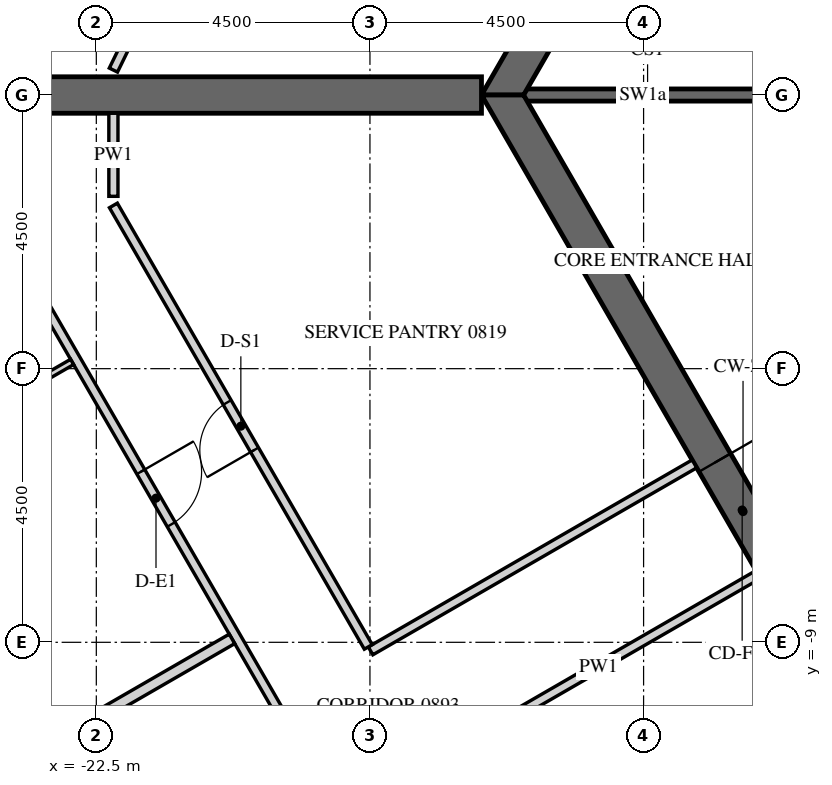
"""IFC4 building model, lengths in metres.
Left out: names, types, materials, properties, quantities, classifications, styles, units other than length and angle.
Written with IfcOpenShell. Run it as: python <this file> out.ifc"""

import sys

from ifc_helpers import new_model, si_unit, direction, frame, frame_2d, origin, place, context, subcontext, project, spatial, polyline, rectangle, outline, extrude, element, fill, save


model = new_model("IFC4")
c1 = context("Model", 3, precision=1e-05, world=origin(), true_north=direction((0.0, 1.0)))
c2 = subcontext(c1, "Body", "Model", "MODEL_VIEW")
j1 = project(units=[si_unit("LENGTHUNIT", "METRE"), si_unit("PLANEANGLEUNIT", "RADIAN")], contexts=[c1])
p1 = place(None, origin())
s1 = spatial("IfcSite", under=j1, at=p1, CompositionType="ELEMENT")
p2 = place(p1, origin())
s2 = spatial("IfcBuilding", under=s1, at=p2, CompositionType="ELEMENT")
p3 = place(p2, frame((0.0, 0.0, 111.6)))
s3 = spatial("IfcBuildingStorey", under=s2, at=p3, CompositionType="ELEMENT", Elevation=111.6)
p4 = place(p3, frame((-19.595, 27.633, -0.15), z_axis=(0.0, 0.0, 1.0), x_axis=(-0.438368285794, -0.898795441694, 0.0)))
e1 = element("IfcWall", 1, at=p4, inside=s3, PredefinedType="SOLIDWALL", context=c2, shape_type="SweptSolid", body=[
    extrude(outline(polyline([(-0.026, -0.275), (30.093, -0.275), (30.048, 0.275), (0.026, 0.275), (-0.026, -0.275)])), origin(), (0.0, 0.0, 1.0), 3.9),
])
p5 = place(p4, frame((1.236, 0.0, 1.05)))
e2 = element("IfcOpeningElement", 2, at=p5, cuts=e1, PredefinedType="OPENING", context=c2, shape_type="SweptSolid", body=[
    extrude(rectangle(XDim=2.4, YDim=2.4, at=frame_2d((1.2, 1.2))), frame((0.0, 0.285, 0.0), z_axis=(0.0, -1.0, 0.0), x_axis=(1.0, 0.0, 0.0)), (0.0, 0.0, 1.0), 0.57),
])
p6 = place(p4, frame((4.835, 0.0, 1.05)))
e3 = element("IfcOpeningElement", 3, at=p6, cuts=e1, PredefinedType="OPENING", context=c2, shape_type="SweptSolid", body=[
    extrude(rectangle(XDim=2.4, YDim=2.4, at=frame_2d((1.2, 1.2))), frame((0.0, 0.285, 0.0), z_axis=(0.0, -1.0, 0.0), x_axis=(1.0, 0.0, 0.0)), (0.0, 0.0, 1.0), 0.57),
])
p7 = place(p4, frame((8.436, 0.0, 1.05)))
e4 = element("IfcOpeningElement", 4, at=p7, cuts=e1, PredefinedType="OPENING", context=c2, shape_type="SweptSolid", body=[
    extrude(rectangle(XDim=2.4, YDim=2.4, at=frame_2d((1.2, 1.2))), frame((0.0, 0.285, 0.0), z_axis=(0.0, -1.0, 0.0), x_axis=(1.0, 0.0, 0.0)), (0.0, 0.0, 1.0), 0.57),
])
p8 = place(p4, frame((12.035, 0.0, 1.05)))
e5 = element("IfcOpeningElement", 5, at=p8, cuts=e1, PredefinedType="OPENING", context=c2, shape_type="SweptSolid", body=[
    extrude(rectangle(XDim=2.4, YDim=2.4, at=frame_2d((1.2, 1.2))), frame((0.0, 0.285, 0.0), z_axis=(0.0, -1.0, 0.0), x_axis=(1.0, 0.0, 0.0)), (0.0, 0.0, 1.0), 0.57),
])
p9 = place(p4, frame((15.635, 0.0, 1.05)))
e6 = element("IfcOpeningElement", 6, at=p9, cuts=e1, PredefinedType="OPENING", context=c2, shape_type="SweptSolid", body=[
    extrude(rectangle(XDim=2.4, YDim=2.4, at=frame_2d((1.2, 1.2))), frame((0.0, 0.285, 0.0), z_axis=(0.0, -1.0, 0.0), x_axis=(1.0, 0.0, 0.0)), (0.0, 0.0, 1.0), 0.57),
])
p10 = place(p4, frame((19.236, 0.0, 1.05)))
e7 = element("IfcOpeningElement", 7, at=p10, cuts=e1, PredefinedType="OPENING", context=c2, shape_type="SweptSolid", body=[
    extrude(rectangle(XDim=2.4, YDim=2.4, at=frame_2d((1.2, 1.2))), frame((0.0, 0.285, 0.0), z_axis=(0.0, -1.0, 0.0), x_axis=(1.0, 0.0, 0.0)), (0.0, 0.0, 1.0), 0.57),
])
p11 = place(p4, frame((22.835, 0.0, 1.05)))
e8 = element("IfcOpeningElement", 8, at=p11, cuts=e1, PredefinedType="OPENING", context=c2, shape_type="SweptSolid", body=[
    extrude(rectangle(XDim=2.4, YDim=2.4, at=frame_2d((1.2, 1.2))), frame((0.0, 0.285, 0.0), z_axis=(0.0, -1.0, 0.0), x_axis=(1.0, 0.0, 0.0)), (0.0, 0.0, 1.0), 0.57),
])
p12 = place(p4, frame((26.436, 0.0, 1.05)))
e9 = element("IfcOpeningElement", 9, at=p12, cuts=e1, PredefinedType="OPENING", context=c2, shape_type="SweptSolid", body=[
    extrude(rectangle(XDim=2.4, YDim=2.4, at=frame_2d((1.2, 1.2))), frame((0.0, 0.285, 0.0), z_axis=(0.0, -1.0, 0.0), x_axis=(1.0, 0.0, 0.0)), (0.0, 0.0, 1.0), 0.57),
])
p13 = place(p3, frame((-32.655, -2.89, -0.15), z_axis=(0.0, 0.0, 1.0), x_axis=(0.499997711317, -0.866026725152, 0.0)))
e10 = element("IfcWall", 10, at=p13, inside=s3, PredefinedType="SOLIDWALL", context=c2, shape_type="SweptSolid", body=[
    extrude(outline(polyline([(-0.022, -0.275), (30.097, -0.275), (30.045, 0.275), (0.022, 0.275), (-0.022, -0.275)])), origin(), (0.0, 0.0, 1.0), 3.9),
])
p14 = place(p13, frame((1.236, 0.0, 1.05)))
e11 = element("IfcOpeningElement", 11, at=p14, cuts=e10, PredefinedType="OPENING", context=c2, shape_type="SweptSolid", body=[
    extrude(rectangle(XDim=2.4, YDim=2.4, at=frame_2d((1.2, 1.2))), frame((0.0, 0.285, 0.0), z_axis=(0.0, -1.0, 0.0), x_axis=(1.0, 0.0, 0.0)), (0.0, 0.0, 1.0), 0.57),
])
p15 = place(p13, frame((4.835, 0.0, 1.05)))
e12 = element("IfcOpeningElement", 12, at=p15, cuts=e10, PredefinedType="OPENING", context=c2, shape_type="SweptSolid", body=[
    extrude(rectangle(XDim=2.4, YDim=2.4, at=frame_2d((1.2, 1.2))), frame((0.0, 0.285, 0.0), z_axis=(0.0, -1.0, 0.0), x_axis=(1.0, 0.0, 0.0)), (0.0, 0.0, 1.0), 0.57),
])
p16 = place(p13, frame((8.436, 0.0, 1.05)))
e13 = element("IfcOpeningElement", 13, at=p16, cuts=e10, PredefinedType="OPENING", context=c2, shape_type="SweptSolid", body=[
    extrude(rectangle(XDim=2.4, YDim=2.4, at=frame_2d((1.2, 1.2))), frame((0.0, 0.285, 0.0), z_axis=(0.0, -1.0, 0.0), x_axis=(1.0, 0.0, 0.0)), (0.0, 0.0, 1.0), 0.57),
])
p17 = place(p13, frame((12.035, 0.0, 1.05)))
e14 = element("IfcOpeningElement", 14, at=p17, cuts=e10, PredefinedType="OPENING", context=c2, shape_type="SweptSolid", body=[
    extrude(rectangle(XDim=2.4, YDim=2.4, at=frame_2d((1.2, 1.2))), frame((0.0, 0.285, 0.0), z_axis=(0.0, -1.0, 0.0), x_axis=(1.0, 0.0, 0.0)), (0.0, 0.0, 1.0), 0.57),
])
p18 = place(p13, frame((15.635, 0.0, 1.05)))
e15 = element("IfcOpeningElement", 15, at=p18, cuts=e10, PredefinedType="OPENING", context=c2, shape_type="SweptSolid", body=[
    extrude(rectangle(XDim=2.4, YDim=2.4, at=frame_2d((1.2, 1.2))), frame((0.0, 0.285, 0.0), z_axis=(0.0, -1.0, 0.0), x_axis=(1.0, 0.0, 0.0)), (0.0, 0.0, 1.0), 0.57),
])
p19 = place(p13, frame((19.236, 0.0, 1.05)))
e16 = element("IfcOpeningElement", 16, at=p19, cuts=e10, PredefinedType="OPENING", context=c2, shape_type="SweptSolid", body=[
    extrude(rectangle(XDim=2.4, YDim=2.4, at=frame_2d((1.2, 1.2))), frame((0.0, 0.285, 0.0), z_axis=(0.0, -1.0, 0.0), x_axis=(1.0, 0.0, 0.0)), (0.0, 0.0, 1.0), 0.57),
])
p20 = place(p13, frame((22.835, 0.0, 1.05)))
e17 = element("IfcOpeningElement", 17, at=p20, cuts=e10, PredefinedType="OPENING", context=c2, shape_type="SweptSolid", body=[
    extrude(rectangle(XDim=2.4, YDim=2.4, at=frame_2d((1.2, 1.2))), frame((0.0, 0.285, 0.0), z_axis=(0.0, -1.0, 0.0), x_axis=(1.0, 0.0, 0.0)), (0.0, 0.0, 1.0), 0.57),
])
p21 = place(p13, frame((26.436, 0.0, 1.05)))
e18 = element("IfcOpeningElement", 18, at=p21, cuts=e10, PredefinedType="OPENING", context=c2, shape_type="SweptSolid", body=[
    extrude(rectangle(XDim=2.4, YDim=2.4, at=frame_2d((1.2, 1.2))), frame((0.0, 0.285, 0.0), z_axis=(0.0, -1.0, 0.0), x_axis=(1.0, 0.0, 0.0)), (0.0, 0.0, 1.0), 0.57),
])
p22 = place(p3, frame((-7.91, 13.7, -0.15), z_axis=(0.0, 0.0, 1.0), x_axis=(-0.499999880136, -0.866025472988, 0.0)))
e19 = element("IfcWall", 19, at=p22, inside=s3, PredefinedType="SHEAR", context=c2, shape_type="SweptSolid", body=[
    extrude(outline(polyline([(-0.173, -0.3), (15.993, -0.3), (15.646, 0.3), (0.173, 0.3), (-0.173, -0.3)])), origin(), (0.0, 0.0, 1.0), 3.9),
])
p23 = place(p22, frame((7.039, 0.0, 0.15)))
e20 = element("IfcOpeningElement", 20, at=p23, cuts=e19, PredefinedType="OPENING", context=c2, shape_type="SweptSolid", body=[
    extrude(rectangle(XDim=1.8, YDim=2.4, at=frame_2d((0.9, 1.2))), frame((0.0, 0.31, 0.0), z_axis=(0.0, -1.0, 0.0), x_axis=(1.0, 0.0, 0.0)), (0.0, 0.0, 1.0), 0.62),
])
p24 = place(p3, frame((-15.819, 0.0, -0.15), z_axis=(0.0, 0.0, 1.0), x_axis=(0.499999880136, -0.866025472988, 0.0)))
e21 = element("IfcWall", 21, at=p24, inside=s3, PredefinedType="SHEAR", context=c2, shape_type="SweptSolid", body=[
    extrude(outline(polyline([(-0.173, -0.3), (15.993, -0.3), (15.646, 0.3), (0.173, 0.3), (-0.173, -0.3)])), origin(), (0.0, 0.0, 1.0), 3.9),
])
p25 = place(p24, frame((6.981, 0.0, 0.15)))
e22 = element("IfcOpeningElement", 22, at=p25, cuts=e21, PredefinedType="OPENING", context=c2, shape_type="SweptSolid", body=[
    extrude(rectangle(XDim=1.8, YDim=2.4, at=frame_2d((0.9, 1.2))), frame((0.0, 0.31, 0.0), z_axis=(0.0, -1.0, 0.0), x_axis=(1.0, 0.0, 0.0)), (0.0, 0.0, 1.0), 0.62),
])
p26 = place(p3, frame((-16.166, 0.0, -0.15), z_axis=(0.0, 0.0, 1.0), x_axis=(-1.0, 0.0, 0.0)))
e23 = element("IfcWall", 23, at=p26, inside=s3, PredefinedType="SHEAR", context=c2, shape_type="SweptSolid", body=[
    extrude(rectangle(XDim=16.509, YDim=0.6, at=frame_2d((8.254, 0.0))), origin(), (0.0, 0.0, 1.0), 3.9),
])
p27 = place(p26, frame((7.354, 0.0, 0.15)))
e24 = element("IfcOpeningElement", 24, at=p27, cuts=e23, PredefinedType="OPENING", context=c2, shape_type="SweptSolid", body=[
    extrude(rectangle(XDim=1.8, YDim=2.4, at=frame_2d((0.9, 1.2))), frame((0.0, 0.31, 0.0), z_axis=(0.0, -1.0, 0.0), x_axis=(1.0, 0.0, 0.0)), (0.0, 0.0, 1.0), 0.62),
])
p28 = place(p3, frame((-11.547, 0.0, -0.15), z_axis=(0.0, 0.0, 1.0), x_axis=(-1.0, 0.0, 0.0)))
e25 = element("IfcWall", 25, at=p28, inside=s3, PredefinedType="SHEAR", context=c2, shape_type="SweptSolid", body=[
    extrude(rectangle(XDim=3.926, YDim=0.2, at=frame_2d((1.963, 0.0))), origin(), (0.0, 0.0, 1.0), 3.9),
])
p29 = place(p3, frame((-22.219, 0.41, 0.0), z_axis=(0.0, 0.0, 1.0), x_axis=(0.438391891827, 0.898783927972, 0.0)))
e26 = element("IfcWall", 26, at=p29, inside=s3, PredefinedType="PARTITIONING", context=c2, shape_type="SweptSolid", body=[
    extrude(rectangle(XDim=9.699, YDim=0.15, at=frame_2d((4.85, 0.0))), origin(), (0.0, 0.0, 1.0), 2.988),
])
p30 = place(p29, frame((4.4, 0.0, 0.0)))
e27 = element("IfcOpeningElement", 27, at=p30, cuts=e26, PredefinedType="OPENING", context=c2, shape_type="SweptSolid", body=[
    extrude(rectangle(XDim=0.9, YDim=2.1, at=frame_2d((0.45, 1.05))), frame((0.0, 0.085, 0.0), z_axis=(0.0, -1.0, 0.0), x_axis=(1.0, 0.0, 0.0)), (0.0, 0.0, 1.0), 0.17),
])
p31 = place(p3, frame((-24.09, -2.175, 0.0), z_axis=(0.0, 0.0, 1.0), x_axis=(0.499996832073, -0.86602723278, 0.0)))
e28 = element("IfcWall", 28, at=p31, inside=s3, PredefinedType="PARTITIONING", context=c2, shape_type="SweptSolid", body=[
    extrude(rectangle(XDim=23.877, YDim=0.15, at=frame_2d((11.938, 0.0))), origin(), (0.0, 0.0, 1.0), 2.988),
])
p32 = place(p31, frame((4.643, 0.0, 0.0)))
e29 = element("IfcOpeningElement", 29, at=p32, cuts=e28, PredefinedType="OPENING", context=c2, shape_type="SweptSolid", body=[
    extrude(rectangle(XDim=1.0, YDim=2.1, at=frame_2d((0.5, 1.05))), frame((0.0, 0.085, 0.0), z_axis=(0.0, -1.0, 0.0), x_axis=(1.0, 0.0, 0.0)), (0.0, 0.0, 1.0), 0.17),
])
p33 = place(p31, frame((11.472, 0.0, 0.0)))
e30 = element("IfcOpeningElement", 30, at=p33, cuts=e28, PredefinedType="OPENING", context=c2, shape_type="SweptSolid", body=[
    extrude(rectangle(XDim=1.0, YDim=2.1, at=frame_2d((0.5, 1.05))), frame((0.0, 0.085, 0.0), z_axis=(0.0, -1.0, 0.0), x_axis=(1.0, 0.0, 0.0)), (0.0, 0.0, 1.0), 0.17),
])
p34 = place(p31, frame((21.925, 0.0, 0.0)))
e31 = element("IfcOpeningElement", 31, at=p34, cuts=e28, PredefinedType="OPENING", context=c2, shape_type="SweptSolid", body=[
    extrude(rectangle(XDim=1.0, YDim=2.1, at=frame_2d((0.5, 1.05))), frame((0.0, 0.085, 0.0), z_axis=(0.0, -1.0, 0.0), x_axis=(1.0, 0.0, 0.0)), (0.0, 0.0, 1.0), 0.17),
])
p35 = place(p3, frame((-12.664, -6.066, 0.0), z_axis=(0.0, 0.0, 1.0), x_axis=(-0.866023618125, -0.500003092839, 0.0)))
e32 = element("IfcWall", 32, at=p35, inside=s3, PredefinedType="PARTITIONING", context=c2, shape_type="SweptSolid", body=[
    extrude(rectangle(XDim=6.15, YDim=0.15, at=frame_2d((3.075, 0.0))), origin(), (0.0, 0.0, 1.0), 2.988),
])
p36 = place(p3, frame((-18.027, -9.076, 0.0), z_axis=(0.0, 0.0, 1.0), x_axis=(-0.500007318041, 0.86602117867, 0.0)))
e33 = element("IfcWall", 33, at=p36, inside=s3, PredefinedType="PARTITIONING", context=c2, shape_type="SweptSolid", body=[
    extrude(rectangle(XDim=8.383, YDim=0.15, at=frame_2d((4.191, 0.0))), origin(), (0.0, 0.0, 1.0), 2.988),
])
p37 = place(p36, frame((3.742, 0.0, 0.0)))
e34 = element("IfcOpeningElement", 34, at=p37, cuts=e33, PredefinedType="OPENING", context=c2, shape_type="SweptSolid", body=[
    extrude(rectangle(XDim=0.9, YDim=2.1, at=frame_2d((0.45, 1.05))), frame((0.0, 0.085, 0.0), z_axis=(0.0, -1.0, 0.0), x_axis=(1.0, 0.0, 0.0)), (0.0, 0.0, 1.0), 0.17),
])
p38 = place(p3, frame((-22.219, -1.666, 0.0), z_axis=(0.0, 0.0, 1.0), x_axis=(0.0, 1.0, 0.0)))
e35 = element("IfcWall", 35, at=p38, inside=s3, PredefinedType="PARTITIONING", context=c2, shape_type="SweptSolid", body=[
    extrude(rectangle(XDim=1.366, YDim=0.15, at=frame_2d((0.683, 0.0))), origin(), (0.0, 0.0, 1.0), 2.988),
])
p39 = place(p3, frame((-16.875, -10.922, 0.0), z_axis=(0.0, 0.0, 1.0), x_axis=(0.866023634079, 0.500003065207, 0.0)))
e36 = element("IfcWall", 36, at=p39, inside=s3, PredefinedType="PARTITIONING", context=c2, shape_type="SweptSolid", body=[
    extrude(rectangle(XDim=6.075, YDim=0.15, at=frame_2d((3.038, 0.0))), origin(), (0.0, 0.0, 1.0), 2.988),
])
p40 = place(p3, frame((-22.898, -4.389, 0.0), z_axis=(0.0, 0.0, 1.0), x_axis=(-0.866046596414, -0.499963291492, 0.0)))
e37 = element("IfcWall", 37, at=p40, inside=s3, PredefinedType="PARTITIONING", context=c2, shape_type="SweptSolid", body=[
    extrude(rectangle(XDim=2.925, YDim=0.1, at=frame_2d((1.462, 0.0))), origin(), (0.0, 0.0, 1.0), 2.988),
])
p41 = place(p40, frame((1.025, 0.0, 0.0)))
e38 = element("IfcOpeningElement", 38, at=p41, cuts=e37, PredefinedType="OPENING", context=c2, shape_type="SweptSolid", body=[
    extrude(rectangle(XDim=0.8, YDim=2.1, at=frame_2d((0.4, 1.05))), frame((0.0, 0.06, 0.0), z_axis=(0.0, -1.0, 0.0), x_axis=(1.0, 0.0, 0.0)), (0.0, 0.0, 1.0), 0.12),
])
p42 = place(p3, frame((-26.699, -12.656, 0.0), z_axis=(0.0, 0.0, 1.0), x_axis=(0.866028983062, 0.499993800457, 0.0)))
e39 = element("IfcWall", 39, at=p42, inside=s3, PredefinedType="PARTITIONING", context=c2, shape_type="SweptSolid", body=[
    extrude(rectangle(XDim=7.425, YDim=0.18, at=frame_2d((3.712, 0.0))), origin(), (0.0, 0.0, 1.0), 2.988),
])
p43 = place(p25, origin())
e40 = element("IfcDoor", 40, at=p43, inside=s3, OperationType="DOUBLE_DOOR_SINGLE_SWING", PredefinedType="DOOR", context=c2, shape_type="SweptSolid", body=[
    extrude(rectangle(XDim=1.8, YDim=2.4, at=frame_2d((0.9, 1.2))), frame((0.0, 0.025, 0.0), z_axis=(0.0, -1.0, 0.0), x_axis=(1.0, 0.0, 0.0)), (0.0, 0.0, 1.0), 0.05),
])
fill(e22, e40)
p44 = place(p32, origin())
e41 = element("IfcDoor", 41, at=p44, inside=s3, OperationType="SINGLE_SWING_RIGHT", PredefinedType="DOOR", context=c2, shape_type="SweptSolid", body=[
    extrude(rectangle(XDim=1.0, YDim=2.1, at=frame_2d((0.5, 1.05))), frame((0.0, 0.025, 0.0), z_axis=(0.0, -1.0, 0.0), x_axis=(1.0, 0.0, 0.0)), (0.0, 0.0, 1.0), 0.05),
])
fill(e29, e41)
p45 = place(p37, origin())
e42 = element("IfcDoor", 42, at=p45, inside=s3, OperationType="SINGLE_SWING_RIGHT", PredefinedType="DOOR", context=c2, shape_type="SweptSolid", body=[
    extrude(rectangle(XDim=0.9, YDim=2.1, at=frame_2d((0.45, 1.05))), frame((0.0, 0.025, 0.0), z_axis=(0.0, -1.0, 0.0), x_axis=(1.0, 0.0, 0.0)), (0.0, 0.0, 1.0), 0.05),
])
fill(e34, e42)
save(model, sys.argv[1])
